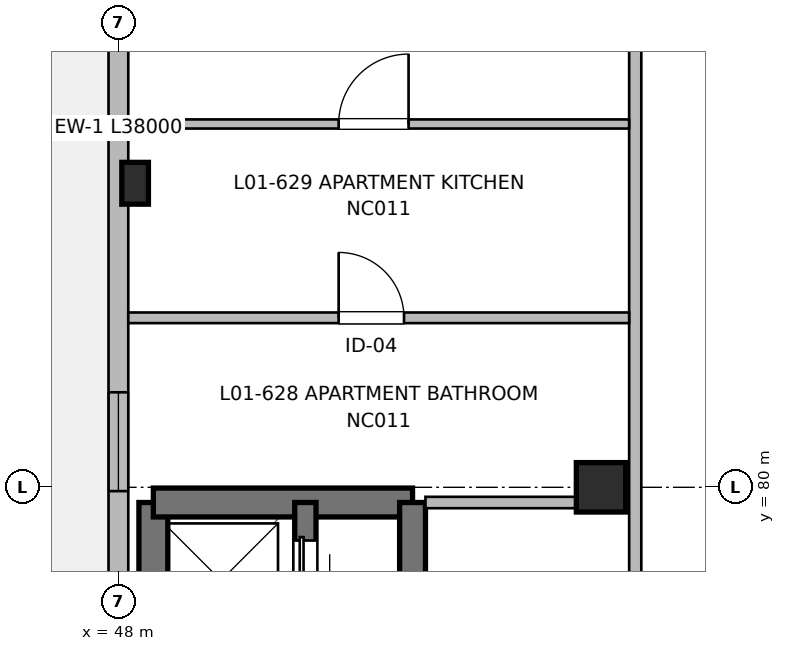
"""IFC4 building model, lengths in metres.
Left out: names, types, materials, properties, quantities, classifications, styles, units other than length and angle.
Written with IfcOpenShell. Run it as: python <this file> out.ifc"""

import sys

from ifc_helpers import new_model, si_unit, direction, frame, frame_2d, origin, origin_2d, place, context, subcontext, project, spatial, rectangle, extrude, element, fill, save


model = new_model("IFC4")
c1 = context("Model", 3, precision=1e-05, world=origin(), true_north=direction((0.0, 1.0)))
c2 = subcontext(c1, "Body", "Model", "MODEL_VIEW")
j1 = project(units=[si_unit("LENGTHUNIT", "METRE"), si_unit("PLANEANGLEUNIT", "RADIAN")], contexts=[c1])
p1 = place(None, origin())
s1 = spatial("IfcSite", under=j1, at=p1, CompositionType="ELEMENT")
p2 = place(p1, origin())
s2 = spatial("IfcBuilding", under=s1, at=p2, CompositionType="ELEMENT")
p3 = place(p2, frame((0.0, 0.0, 4.16)))
s3 = spatial("IfcBuildingStorey", under=s2, at=p3, CompositionType="ELEMENT", Elevation=4.16)
p4 = place(p3, frame((48.22, 84.0, 0.0), z_axis=(0.0, 0.0, 1.0), x_axis=(1.0, 0.0, 0.0)))
e1 = element("IfcColumn", 1, at=p4, inside=s3, PredefinedType="PILASTER", context=c2, shape_type="SweptSolid", body=[
    extrude(rectangle(XDim=0.35, YDim=0.55, at=origin_2d()), origin(), (0.0, 0.0, 1.0), 3.2),
])
p5 = place(p3, frame((54.35, 80.0, 0.0), z_axis=(0.0, 0.0, 1.0), x_axis=(1.0, 0.0, 0.0)))
e2 = element("IfcColumn", 2, at=p5, inside=s3, PredefinedType="COLUMN", context=c2, shape_type="SweptSolid", body=[
    extrude(rectangle(XDim=0.65, YDim=0.65, at=origin_2d()), origin(), (0.0, 0.0, 1.0), 3.2),
])
p6 = place(p3, frame((48.46, 67.35, 0.0), z_axis=(0.0, 0.0, 1.0), x_axis=(0.0, 1.0, 0.0)))
e3 = element("IfcWall", 3, at=p6, inside=s3, PredefinedType="SHEAR", context=c2, shape_type="SweptSolid", body=[
    extrude(rectangle(XDim=12.45, YDim=0.38, at=frame_2d((6.225, 0.0))), origin(), (0.0, 0.0, 1.0), 3.2),
])
p7 = place(p6, frame((2.2, 0.0, 0.97)))
e4 = element("IfcOpeningElement", 4, at=p7, cuts=e3, PredefinedType="OPENING", context=c2, shape_type="SweptSolid", body=[
    extrude(rectangle(XDim=0.95, YDim=1.25, at=frame_2d((0.475, 0.625))), frame((0.0, 0.2, 0.0), z_axis=(0.0, -1.0, 0.0), x_axis=(1.0, 0.0, 0.0)), (0.0, 0.0, 1.0), 0.4),
])
p8 = place(p3, frame((48.46, 79.8, 0.0), z_axis=(0.0, 0.0, 1.0), x_axis=(1.0, 0.0, 0.0)))
e5 = element("IfcWall", 5, at=p8, inside=s3, PredefinedType="SHEAR", context=c2, shape_type="SweptSolid", body=[
    extrude(rectangle(XDim=3.41, YDim=0.38, at=frame_2d((1.705, 0.0))), origin(), (0.0, 0.0, 1.0), 3.2),
])
p9 = place(p3, frame((51.87, 79.8, 0.0), z_axis=(0.0, 0.0, 1.0), x_axis=(0.0, -1.0, 0.0)))
e6 = element("IfcWall", 6, at=p9, inside=s3, PredefinedType="SHEAR", context=c2, shape_type="SweptSolid", body=[
    extrude(rectangle(XDim=12.45, YDim=0.34, at=frame_2d((6.225, 0.0))), origin(), (0.0, 0.0, 1.0), 3.2),
])
p10 = place(p9, frame((10.85, 0.0, 0.0)))
e7 = element("IfcOpeningElement", 7, at=p10, cuts=e6, PredefinedType="OPENING", context=c2, shape_type="SweptSolid", body=[
    extrude(rectangle(XDim=1.05, YDim=2.15, at=frame_2d((0.525, 1.075))), frame((0.0, 0.18, 0.0), z_axis=(0.0, -1.0, 0.0), x_axis=(1.0, 0.0, 0.0)), (0.0, 0.0, 1.0), 0.36),
])
p11 = place(p3, frame((50.46, 74.55, 0.0), z_axis=(0.0, 0.0, 1.0), x_axis=(0.0, 1.0, 0.0)))
e8 = element("IfcWall", 8, at=p11, inside=s3, PredefinedType="SHEAR", context=c2, shape_type="SweptSolid", body=[
    extrude(rectangle(XDim=5.25, YDim=0.28, at=frame_2d((2.625, 0.0))), origin(), (0.0, 0.0, 1.0), 3.2),
])
p12 = place(p11, frame((1.15, 0.0, 0.0)))
e9 = element("IfcOpeningElement", 9, at=p12, cuts=e8, PredefinedType="OPENING", context=c2, shape_type="SweptSolid", body=[
    extrude(rectangle(XDim=1.0, YDim=2.15, at=frame_2d((0.5, 1.075))), frame((0.0, 0.15, 0.0), z_axis=(0.0, -1.0, 0.0), x_axis=(1.0, 0.0, 0.0)), (0.0, 0.0, 1.0), 0.3),
])
p13 = place(p11, frame((3.85, 0.0, 0.0)))
e10 = element("IfcOpeningElement", 10, at=p13, cuts=e8, PredefinedType="OPENING", context=c2, shape_type="SweptSolid", body=[
    extrude(rectangle(XDim=0.9, YDim=2.15, at=frame_2d((0.45, 1.075))), frame((0.0, 0.15, 0.0), z_axis=(0.0, -1.0, 0.0), x_axis=(1.0, 0.0, 0.0)), (0.0, 0.0, 1.0), 0.3),
])
p14 = place(p3, frame((48.0, 56.0, 0.0), z_axis=(0.0, 0.0, 1.0), x_axis=(0.0, 1.0, 0.0)))
e11 = element("IfcWall", 11, at=p14, inside=s3, PredefinedType="SOLIDWALL", context=c2, shape_type="SweptSolid", body=[
    extrude(rectangle(XDim=38.0, YDim=0.26, at=frame_2d((19.0, 0.0))), origin(), (0.0, 0.0, 1.0), 2.98),
])
p15 = place(p14, frame((4.95, 0.0, 0.0)))
e12 = element("IfcOpeningElement", 12, at=p15, cuts=e11, PredefinedType="OPENING", context=c2, shape_type="SweptSolid", body=[
    extrude(rectangle(XDim=1.2, YDim=2.2, at=frame_2d((0.6, 1.1))), frame((0.0, 0.14, 0.0), z_axis=(0.0, -1.0, 0.0), x_axis=(1.0, 0.0, 0.0)), (0.0, 0.0, 1.0), 0.28),
])
p16 = place(p14, frame((13.625, 0.0, 0.87)))
e13 = element("IfcOpeningElement", 13, at=p16, cuts=e11, PredefinedType="OPENING", context=c2, shape_type="SweptSolid", body=[
    extrude(rectangle(XDim=1.25, YDim=1.35, at=frame_2d((0.625, 0.675))), frame((0.0, 0.14, 0.0), z_axis=(0.0, -1.0, 0.0), x_axis=(1.0, 0.0, 0.0)), (0.0, 0.0, 1.0), 0.28),
])
p17 = place(p14, frame((23.95, 0.0, 0.82)))
e14 = element("IfcOpeningElement", 14, at=p17, cuts=e11, PredefinedType="OPENING", context=c2, shape_type="SweptSolid", body=[
    extrude(rectangle(XDim=1.3, YDim=1.4, at=frame_2d((0.65, 0.7))), frame((0.0, 0.14, 0.0), z_axis=(0.0, -1.0, 0.0), x_axis=(1.0, 0.0, 0.0)), (0.0, 0.0, 1.0), 0.28),
])
p18 = place(p14, frame((32.2, 0.0, 0.67)))
e15 = element("IfcOpeningElement", 15, at=p18, cuts=e11, PredefinedType="OPENING", context=c2, shape_type="SweptSolid", body=[
    extrude(rectangle(XDim=2.1, YDim=1.55, at=frame_2d((1.05, 0.775))), frame((0.0, 0.14, 0.0), z_axis=(0.0, -1.0, 0.0), x_axis=(1.0, 0.0, 0.0)), (0.0, 0.0, 1.0), 0.28),
])
p19 = place(p3, frame((52.04, 79.8, 0.0), z_axis=(0.0, 0.0, 1.0), x_axis=(1.0, 0.0, 0.0)))
e16 = element("IfcWall", 16, at=p19, inside=s3, PredefinedType="PARTITIONING", context=c2, shape_type="SweptSolid", body=[
    extrude(rectangle(XDim=2.68, YDim=0.15, at=frame_2d((1.34, 0.0))), origin(), (0.0, 0.0, 1.0), 2.935),
])
p20 = place(p3, frame((54.8, 56.18, 0.0), z_axis=(0.0, 0.0, 1.0), x_axis=(0.0, 1.0, 0.0)))
e17 = element("IfcWall", 17, at=p20, inside=s3, PredefinedType="PARTITIONING", context=c2, shape_type="SweptSolid", body=[
    extrude(rectangle(XDim=50.62, YDim=0.16, at=frame_2d((25.31, 0.0))), origin(), (0.0, 0.0, 1.0), 2.935),
])
p21 = place(p20, frame((12.82, 0.0, 0.0)))
e18 = element("IfcOpeningElement", 18, at=p21, cuts=e17, PredefinedType="OPENING", context=c2, shape_type="SweptSolid", body=[
    extrude(rectangle(XDim=1.1, YDim=2.15, at=frame_2d((0.55, 1.075))), frame((0.0, 0.09, 0.0), z_axis=(0.0, -1.0, 0.0), x_axis=(1.0, 0.0, 0.0)), (0.0, 0.0, 1.0), 0.18),
])
p22 = place(p20, frame((19.22, 0.0, 0.0)))
e19 = element("IfcOpeningElement", 19, at=p22, cuts=e17, PredefinedType="OPENING", context=c2, shape_type="SweptSolid", body=[
    extrude(rectangle(XDim=1.6, YDim=2.15, at=frame_2d((0.8, 1.075))), frame((0.0, 0.09, 0.0), z_axis=(0.0, -1.0, 0.0), x_axis=(1.0, 0.0, 0.0)), (0.0, 0.0, 1.0), 0.18),
])
p23 = place(p20, frame((1.8, 0.0, 0.0)))
e20 = element("IfcOpeningElement", 20, at=p23, cuts=e17, PredefinedType="OPENING", context=c2, shape_type="SweptSolid", body=[
    extrude(rectangle(XDim=0.96, YDim=2.15, at=frame_2d((0.48, 1.075))), frame((0.0, 0.09, 0.0), z_axis=(0.0, -1.0, 0.0), x_axis=(1.0, 0.0, 0.0)), (0.0, 0.0, 1.0), 0.18),
])
p24 = place(p20, frame((32.725, 0.0, 0.0)))
e21 = element("IfcOpeningElement", 21, at=p24, cuts=e17, PredefinedType="OPENING", context=c2, shape_type="SweptSolid", body=[
    extrude(rectangle(XDim=0.98, YDim=2.15, at=frame_2d((0.49, 1.075))), frame((0.0, 0.09, 0.0), z_axis=(0.0, -1.0, 0.0), x_axis=(1.0, 0.0, 0.0)), (0.0, 0.0, 1.0), 0.18),
])
p25 = place(p20, frame((40.935, 0.0, 0.0)))
e22 = element("IfcOpeningElement", 22, at=p25, cuts=e17, PredefinedType="OPENING", context=c2, shape_type="SweptSolid", body=[
    extrude(rectangle(XDim=0.98, YDim=2.15, at=frame_2d((0.49, 1.075))), frame((0.0, 0.09, 0.0), z_axis=(0.0, -1.0, 0.0), x_axis=(1.0, 0.0, 0.0)), (0.0, 0.0, 1.0), 0.18),
])
p26 = place(p3, frame((48.13, 82.23, 0.0), z_axis=(0.0, 0.0, 1.0), x_axis=(1.0, 0.0, 0.0)))
e23 = element("IfcWall", 23, at=p26, inside=s3, PredefinedType="PARTITIONING", context=c2, shape_type="SweptSolid", body=[
    extrude(rectangle(XDim=6.59, YDim=0.14, at=frame_2d((3.295, 0.0))), origin(), (0.0, 0.0, 1.0), 2.935),
])
p27 = place(p26, frame((2.768, 0.0, 0.0)))
e24 = element("IfcOpeningElement", 24, at=p27, cuts=e23, PredefinedType="OPENING", context=c2, shape_type="SweptSolid", body=[
    extrude(rectangle(XDim=0.86, YDim=2.1, at=frame_2d((0.43, 1.05))), frame((0.0, 0.08, 0.0), z_axis=(0.0, -1.0, 0.0), x_axis=(1.0, 0.0, 0.0)), (0.0, 0.0, 1.0), 0.16),
])
p28 = place(p3, frame((48.13, 84.78, 0.0), z_axis=(0.0, 0.0, 1.0), x_axis=(1.0, 0.0, 0.0)))
e25 = element("IfcWall", 25, at=p28, inside=s3, PredefinedType="PARTITIONING", context=c2, shape_type="SweptSolid", body=[
    extrude(rectangle(XDim=6.59, YDim=0.12, at=frame_2d((3.295, 0.0))), origin(), (0.0, 0.0, 1.0), 2.935),
])
p29 = place(p28, frame((2.768, 0.0, 0.0)))
e26 = element("IfcOpeningElement", 26, at=p29, cuts=e25, PredefinedType="OPENING", context=c2, shape_type="SweptSolid", body=[
    extrude(rectangle(XDim=0.92, YDim=2.1, at=frame_2d((0.46, 1.05))), frame((0.0, 0.07, 0.0), z_axis=(0.0, -1.0, 0.0), x_axis=(1.0, 0.0, 0.0)), (0.0, 0.0, 1.0), 0.14),
])
p30 = place(p13, origin())
e27 = element("IfcDoor", 27, at=p30, inside=s3, OperationType="SLIDING_TO_RIGHT", PredefinedType="DOOR", context=c2, shape_type="SweptSolid", body=[
    extrude(rectangle(XDim=0.9, YDim=2.15, at=frame_2d((0.45, 1.075))), frame((0.0, 0.025, 0.0), z_axis=(0.0, -1.0, 0.0), x_axis=(1.0, 0.0, 0.0)), (0.0, 0.0, 1.0), 0.05),
])
fill(e10, e27)
p31 = place(p17, origin())
e28 = element("IfcWindow", 28, at=p31, inside=s3, PartitioningType="SINGLE_PANEL", PredefinedType="WINDOW", context=c2, shape_type="SweptSolid", body=[
    extrude(rectangle(XDim=1.3, YDim=1.4, at=frame_2d((0.65, 0.7))), frame((0.0, 0.03, 0.0), z_axis=(0.0, -1.0, 0.0), x_axis=(1.0, 0.0, 0.0)), (0.0, 0.0, 1.0), 0.06),
])
fill(e14, e28)
p32 = place(p27, origin())
e29 = element("IfcDoor", 29, at=p32, inside=s3, OperationType="SINGLE_SWING_LEFT", PredefinedType="DOOR", context=c2, shape_type="SweptSolid", body=[
    extrude(rectangle(XDim=0.86, YDim=2.1, at=frame_2d((0.43, 1.05))), frame((0.0, 0.025, 0.0), z_axis=(0.0, -1.0, 0.0), x_axis=(1.0, 0.0, 0.0)), (0.0, 0.0, 1.0), 0.05),
])
fill(e24, e29)
p33 = place(p29, origin())
e30 = element("IfcDoor", 30, at=p33, inside=s3, OperationType="SINGLE_SWING_RIGHT", PredefinedType="DOOR", context=c2, shape_type="SweptSolid", body=[
    extrude(rectangle(XDim=0.92, YDim=2.1, at=frame_2d((0.46, 1.05))), frame((0.0, 0.025, 0.0), z_axis=(0.0, -1.0, 0.0), x_axis=(1.0, 0.0, 0.0)), (0.0, 0.0, 1.0), 0.05),
])
fill(e26, e30)
save(model, sys.argv[1])
